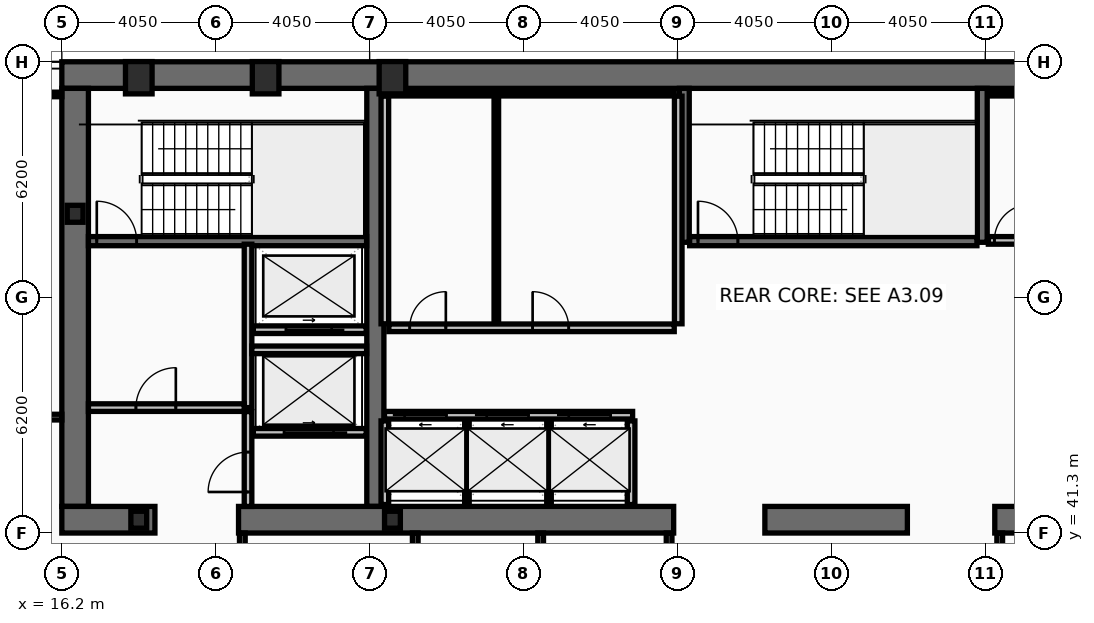
"""IFC4 building model, lengths in metres.
Left out: names, types, materials, properties, quantities, classifications, styles, units other than length and angle.
Written with IfcOpenShell. Run it as: python <this file> out.ifc"""

import sys

from ifc_helpers import new_model, si_unit, direction, frame, frame_2d, origin, origin_2d, place, context, subcontext, project, spatial, rectangle, hollow_rectangle, i_section, extrude, element, fill, save


model = new_model("IFC4")
c1 = context("Model", 3, precision=1e-05, world=origin(), true_north=direction((0.0, 1.0)))
c2 = subcontext(c1, "Body", "Model", "MODEL_VIEW")
j1 = project(units=[si_unit("LENGTHUNIT", "METRE"), si_unit("PLANEANGLEUNIT", "RADIAN")], contexts=[c1])
p1 = place(None, origin())
s1 = spatial("IfcSite", under=j1, at=p1, CompositionType="ELEMENT")
p2 = place(p1, origin())
s2 = spatial("IfcBuilding", under=s1, at=p2, CompositionType="ELEMENT")
p3 = place(p2, frame((0.0, 0.0, 147.0)))
s3 = spatial("IfcBuildingStorey", under=s2, at=p3, CompositionType="ELEMENT", Elevation=147.0)
p4 = place(p3, frame((16.2, 53.35, 0.0), z_axis=(0.0, 0.0, 1.0), x_axis=(1.0, 0.0, 0.0)))
e1 = element("IfcWall", 1, at=p4, inside=s3, PredefinedType="SHEAR", context=c2, shape_type="SweptSolid", body=[
    extrude(rectangle(XDim=40.5, YDim=0.7, at=frame_2d((20.25, 0.0))), origin(), (0.0, 0.0, 1.0), 3.44),
])
p5 = place(p3, frame((16.55, 42.0, 0.0), z_axis=(0.0, 0.0, 1.0), x_axis=(0.0, 1.0, 0.0)))
e2 = element("IfcWall", 2, at=p5, inside=s3, PredefinedType="SHEAR", context=c2, shape_type="SweptSolid", body=[
    extrude(rectangle(XDim=11.0, YDim=0.7, at=frame_2d((5.5, 0.0))), origin(), (0.0, 0.0, 1.0), 3.44),
])
p6 = place(p3, frame((24.45, 42.0, 0.0), z_axis=(0.0, 0.0, 1.0), x_axis=(0.0, 1.0, 0.0)))
e3 = element("IfcWall", 3, at=p6, inside=s3, PredefinedType="SHEAR", context=c2, shape_type="SweptSolid", body=[
    extrude(rectangle(XDim=11.0, YDim=0.45, at=frame_2d((5.5, 0.0))), origin(), (0.0, 0.0, 1.0), 3.44),
])
p7 = place(p3, frame((18.65, 41.65, 0.0), z_axis=(0.0, 0.0, 1.0), x_axis=(-1.0, 0.0, 0.0)))
e4 = element("IfcWall", 4, at=p7, inside=s3, PredefinedType="SHEAR", context=c2, shape_type="SweptSolid", body=[
    extrude(rectangle(XDim=2.45, YDim=0.7, at=frame_2d((1.225, 0.0))), origin(), (0.0, 0.0, 1.0), 3.44),
])
p8 = place(p3, frame((32.3, 41.65, 0.0), z_axis=(0.0, 0.0, 1.0), x_axis=(-1.0, 0.0, 0.0)))
e5 = element("IfcWall", 5, at=p8, inside=s3, PredefinedType="SHEAR", context=c2, shape_type="SweptSolid", body=[
    extrude(rectangle(XDim=11.45, YDim=0.7, at=frame_2d((5.725, 0.0))), origin(), (0.0, 0.0, 1.0), 3.44),
])
p9 = place(p3, frame((38.45, 41.65, 0.0), z_axis=(0.0, 0.0, 1.0), x_axis=(-1.0, 0.0, 0.0)))
e6 = element("IfcWall", 6, at=p9, inside=s3, PredefinedType="SHEAR", context=c2, shape_type="SweptSolid", body=[
    extrude(rectangle(XDim=3.75, YDim=0.7, at=frame_2d((1.875, 0.0))), origin(), (0.0, 0.0, 1.0), 3.44),
])
p10 = place(p3, frame((52.05, 41.65, 0.0), z_axis=(0.0, 0.0, 1.0), x_axis=(-1.0, 0.0, 0.0)))
e7 = element("IfcWall", 7, at=p10, inside=s3, PredefinedType="SHEAR", context=c2, shape_type="SweptSolid", body=[
    extrude(rectangle(XDim=11.3, YDim=0.7, at=frame_2d((5.65, 0.0))), origin(), (0.0, 0.0, 1.0), 3.44),
])
for number, where, z_axis, x_axis in (
    (8, (32.58, 48.95, 0.0), (0.0, 0.0, 1.0), (0.0, 1.0, 0.0)),
    (9, (40.42, 48.95, 0.0), (0.0, 0.0, 1.0), (0.0, 1.0, 0.0)),
):
    element("IfcWall", number, at=place(p3, frame(where, z_axis=z_axis, x_axis=x_axis)), inside=s3, PredefinedType="SHEAR", context=c2, shape_type="SweptSolid", body=[
        extrude(rectangle(XDim=4.05, YDim=0.26, at=frame_2d((2.025, 0.0))), origin(), (0.0, 0.0, 1.0), 3.44),
    ])
p11 = place(p3, frame((16.9, 48.98, 0.0), z_axis=(0.0, 0.0, 1.0), x_axis=(1.0, 0.0, 0.0)))
e10 = element("IfcWall", 10, at=p11, inside=s3, PredefinedType="SHEAR", context=c2, shape_type="SweptSolid", body=[
    extrude(rectangle(XDim=7.32, YDim=0.24, at=frame_2d((3.66, 0.0))), origin(), (0.0, 0.0, 1.0), 3.44),
])
p12 = place(p11, frame((0.22, 0.0, 0.0)))
e11 = element("IfcOpeningElement", 11, at=p12, cuts=e10, PredefinedType="OPENING", context=c2, shape_type="SweptSolid", body=[
    extrude(rectangle(XDim=1.05, YDim=2.15, at=frame_2d((0.525, 1.075))), frame((0.0, 0.13, 0.0), z_axis=(0.0, -1.0, 0.0), x_axis=(1.0, 0.0, 0.0)), (0.0, 0.0, 1.0), 0.26),
])
p13 = place(p3, frame((32.72, 48.98, 0.0), z_axis=(0.0, 0.0, 1.0), x_axis=(1.0, 0.0, 0.0)))
e12 = element("IfcWall", 12, at=p13, inside=s3, PredefinedType="SHEAR", context=c2, shape_type="SweptSolid", body=[
    extrude(rectangle(XDim=7.56, YDim=0.24, at=frame_2d((3.78, 0.0))), origin(), (0.0, 0.0, 1.0), 3.44),
])
p14 = place(p13, frame((0.22, 0.0, 0.0)))
e13 = element("IfcOpeningElement", 13, at=p14, cuts=e12, PredefinedType="OPENING", context=c2, shape_type="SweptSolid", body=[
    extrude(rectangle(XDim=1.05, YDim=2.15, at=frame_2d((0.525, 1.075))), frame((0.0, 0.13, 0.0), z_axis=(0.0, -1.0, 0.0), x_axis=(1.0, 0.0, 0.0)), (0.0, 0.0, 1.0), 0.26),
])
for number, where, z_axis, x_axis in (
    (14, (18.225, 53.28, 0.0), (0.0, 0.0, 1.0), (1.0, 0.0, 0.0)),
    (15, (21.562, 53.28, 0.0), (0.0, 0.0, 1.0), (1.0, 0.0, 0.0)),
    (16, (24.9, 53.28, 0.0), (0.0, 0.0, 1.0), (1.0, 0.0, 0.0)),
):
    element("IfcColumn", number, at=place(p3, frame(where, z_axis=z_axis, x_axis=x_axis)), inside=s3, PredefinedType="COLUMN", context=c2, shape_type="SweptSolid", body=[
        extrude(hollow_rectangle(XDim=0.7, YDim=0.85, WallThickness=0.05, at=origin_2d()), origin(), (0.0, 0.0, 1.0), 3.6),
    ])
for number, where, z_axis, x_axis in (
    (17, (16.55, 49.7, 0.0), (0.0, 0.0, 1.0), (1.0, 0.0, 0.0)),
    (18, (18.225, 41.65, 0.0), (0.0, 0.0, 1.0), (1.0, 0.0, 0.0)),
    (19, (24.9, 41.65, 0.0), (0.0, 0.0, 1.0), (1.0, 0.0, 0.0)),
):
    element("IfcColumn", number, at=place(p3, frame(where, z_axis=z_axis, x_axis=x_axis)), inside=s3, PredefinedType="COLUMN", context=c2, shape_type="SweptSolid", body=[
        extrude(i_section(OverallWidth=0.416, OverallDepth=0.446, WebThickness=0.039, FlangeThickness=0.063, at=origin_2d()), origin(), (0.0, 0.0, 1.0), 3.6),
    ])
p15 = place(p3, frame((24.69, 44.4, 0.0), z_axis=(0.0, 0.0, 1.0), x_axis=(1.0, 0.0, 0.0)))
e20 = element("IfcWall", 20, at=p15, inside=s3, PredefinedType="PARTITIONING", context=c2, shape_type="SweptSolid", body=[
    extrude(rectangle(XDim=6.53, YDim=0.2, at=frame_2d((3.265, 0.0))), origin(), (0.0, 0.0, 1.0), 3.44),
])
p16 = place(p15, frame((0.53, 0.0, 0.0)))
e21 = element("IfcOpeningElement", 21, at=p16, cuts=e20, PredefinedType="OPENING", context=c2, shape_type="SweptSolid", body=[
    extrude(rectangle(XDim=1.1, YDim=2.18, at=frame_2d((0.55, 1.09))), frame((0.0, 0.11, 0.0), z_axis=(0.0, -1.0, 0.0), x_axis=(1.0, 0.0, 0.0)), (0.0, 0.0, 1.0), 0.22),
])
p17 = place(p15, frame((2.69, 0.0, 0.0)))
e22 = element("IfcOpeningElement", 22, at=p17, cuts=e20, PredefinedType="OPENING", context=c2, shape_type="SweptSolid", body=[
    extrude(rectangle(XDim=1.1, YDim=2.18, at=frame_2d((0.55, 1.09))), frame((0.0, 0.11, 0.0), z_axis=(0.0, -1.0, 0.0), x_axis=(1.0, 0.0, 0.0)), (0.0, 0.0, 1.0), 0.22),
])
p18 = place(p15, frame((4.85, 0.0, 0.0)))
e23 = element("IfcOpeningElement", 23, at=p18, cuts=e20, PredefinedType="OPENING", context=c2, shape_type="SweptSolid", body=[
    extrude(rectangle(XDim=1.1, YDim=2.18, at=frame_2d((0.55, 1.09))), frame((0.0, 0.11, 0.0), z_axis=(0.0, -1.0, 0.0), x_axis=(1.0, 0.0, 0.0)), (0.0, 0.0, 1.0), 0.22),
])
p19 = place(p3, frame((24.21, 43.95, 0.0), z_axis=(0.0, 0.0, 1.0), x_axis=(-1.0, 0.0, 0.0)))
e24 = element("IfcWall", 24, at=p19, inside=s3, PredefinedType="PARTITIONING", context=c2, shape_type="SweptSolid", body=[
    extrude(rectangle(XDim=2.97, YDim=0.2, at=frame_2d((1.485, 0.0))), origin(), (0.0, 0.0, 1.0), 3.44),
])
p20 = place(p19, frame((0.86, 0.0, 0.0)))
e25 = element("IfcOpeningElement", 25, at=p20, cuts=e24, PredefinedType="OPENING", context=c2, shape_type="SweptSolid", body=[
    extrude(rectangle(XDim=1.3, YDim=2.18, at=frame_2d((0.65, 1.09))), frame((0.0, 0.11, 0.0), z_axis=(0.0, -1.0, 0.0), x_axis=(1.0, 0.0, 0.0)), (0.0, 0.0, 1.0), 0.22),
])
p21 = place(p3, frame((24.21, 46.65, 0.0), z_axis=(0.0, 0.0, 1.0), x_axis=(-1.0, 0.0, 0.0)))
e26 = element("IfcWall", 26, at=p21, inside=s3, PredefinedType="PARTITIONING", context=c2, shape_type="SweptSolid", body=[
    extrude(rectangle(XDim=2.97, YDim=0.2, at=frame_2d((1.485, 0.0))), origin(), (0.0, 0.0, 1.0), 3.44),
])
p22 = place(p21, frame((0.91, 0.0, 0.0)))
e27 = element("IfcOpeningElement", 27, at=p22, cuts=e26, PredefinedType="OPENING", context=c2, shape_type="SweptSolid", body=[
    extrude(rectangle(XDim=1.2, YDim=2.18, at=frame_2d((0.6, 1.09))), frame((0.0, 0.11, 0.0), z_axis=(0.0, -1.0, 0.0), x_axis=(1.0, 0.0, 0.0)), (0.0, 0.0, 1.0), 0.22),
])
p23 = place(p3, frame((21.1, 44.6, 0.0), z_axis=(0.0, 0.0, 1.0), x_axis=(0.0, 1.0, 0.0)))
e28 = element("IfcWall", 28, at=p23, inside=s3, PredefinedType="PARTITIONING", context=c2, shape_type="SweptSolid", body=[
    extrude(rectangle(XDim=4.3, YDim=0.2, at=frame_2d((2.15, 0.0))), origin(), (0.0, 0.0, 1.0), 3.44),
])
p24 = place(p3, frame((16.9, 44.6, 0.0), z_axis=(0.0, 0.0, 1.0), x_axis=(1.0, 0.0, 0.0)))
e29 = element("IfcWall", 29, at=p24, inside=s3, PredefinedType="PARTITIONING", context=c2, shape_type="SweptSolid", body=[
    extrude(rectangle(XDim=4.1, YDim=0.2, at=frame_2d((2.05, 0.0))), origin(), (0.0, 0.0, 1.0), 3.44),
])
p25 = place(p24, frame((1.25, 0.0, 0.0)))
e30 = element("IfcOpeningElement", 30, at=p25, cuts=e29, PredefinedType="OPENING", context=c2, shape_type="SweptSolid", body=[
    extrude(rectangle(XDim=1.05, YDim=2.15, at=frame_2d((0.525, 1.075))), frame((0.0, 0.11, 0.0), z_axis=(0.0, -1.0, 0.0), x_axis=(1.0, 0.0, 0.0)), (0.0, 0.0, 1.0), 0.22),
])
p26 = place(p3, frame((21.2, 46.12, 0.0), z_axis=(0.0, 0.0, 1.0), x_axis=(1.0, 0.0, 0.0)))
e31 = element("IfcWall", 31, at=p26, inside=s3, PredefinedType="PARTITIONING", context=c2, shape_type="SweptSolid", body=[
    extrude(rectangle(XDim=3.02, YDim=0.2, at=frame_2d((1.51, 0.0))), origin(), (0.0, 0.0, 1.0), 3.44),
])
p27 = place(p3, frame((21.1, 42.0, 0.0), z_axis=(0.0, 0.0, 1.0), x_axis=(0.0, 1.0, 0.0)))
e32 = element("IfcWall", 32, at=p27, inside=s3, PredefinedType="PARTITIONING", context=c2, shape_type="SweptSolid", body=[
    extrude(rectangle(XDim=2.495, YDim=0.2, at=frame_2d((1.248, 0.0))), origin(), (0.0, 0.0, 1.0), 3.44),
])
p28 = place(p27, frame((0.38, 0.0, 0.0)))
e33 = element("IfcOpeningElement", 33, at=p28, cuts=e32, PredefinedType="OPENING", context=c2, shape_type="SweptSolid", body=[
    extrude(rectangle(XDim=1.05, YDim=2.15, at=frame_2d((0.525, 1.075))), frame((0.0, 0.11, 0.0), z_axis=(0.0, -1.0, 0.0), x_axis=(1.0, 0.0, 0.0)), (0.0, 0.0, 1.0), 0.22),
])
for number, where, z_axis, x_axis in (
    (34, (24.7, 46.805, 0.0), (0.0, 0.0, 1.0), (0.0, 1.0, 0.0)),
    (35, (32.42, 46.805, 0.0), (0.0, 0.0, 1.0), (0.0, 1.0, 0.0)),
):
    element("IfcWall", number, at=place(p3, frame(where, z_axis=z_axis, x_axis=x_axis)), inside=s3, PredefinedType="PARTITIONING", context=c2, shape_type="SweptSolid", body=[
        extrude(rectangle(XDim=5.99, YDim=0.2, at=frame_2d((2.995, 0.0))), origin(), (0.0, 0.0, 1.0), 3.44),
    ])
p29 = place(p3, frame((24.805, 52.86, 0.0), z_axis=(0.0, 0.0, 1.0), x_axis=(1.0, 0.0, 0.0)))
e36 = element("IfcWall", 36, at=p29, inside=s3, PredefinedType="PARTITIONING", context=c2, shape_type="SweptSolid", body=[
    extrude(rectangle(XDim=7.51, YDim=0.12, at=frame_2d((3.755, 0.0))), origin(), (0.0, 0.0, 1.0), 3.44),
])
p30 = place(p3, frame((27.634, 46.805, 0.0), z_axis=(0.0, 0.0, 1.0), x_axis=(0.0, 1.0, 0.0)))
e37 = element("IfcWall", 37, at=p30, inside=s3, PredefinedType="PARTITIONING", context=c2, shape_type="SweptSolid", body=[
    extrude(rectangle(XDim=5.99, YDim=0.12, at=frame_2d((2.995, 0.0))), origin(), (0.0, 0.0, 1.0), 3.44),
])
p31 = place(p3, frame((24.805, 46.7, 0.0), z_axis=(0.0, 0.0, 1.0), x_axis=(1.0, 0.0, 0.0)))
e38 = element("IfcWall", 38, at=p31, inside=s3, PredefinedType="PARTITIONING", context=c2, shape_type="SweptSolid", body=[
    extrude(rectangle(XDim=7.51, YDim=0.2, at=frame_2d((3.755, 0.0))), origin(), (0.0, 0.0, 1.0), 3.44),
])
p32 = place(p31, frame((0.55, 0.0, 0.0)))
e39 = element("IfcOpeningElement", 39, at=p32, cuts=e38, PredefinedType="OPENING", context=c2, shape_type="SweptSolid", body=[
    extrude(rectangle(XDim=0.95, YDim=2.1, at=frame_2d((0.475, 1.05))), frame((0.0, 0.11, 0.0), z_axis=(0.0, -1.0, 0.0), x_axis=(1.0, 0.0, 0.0)), (0.0, 0.0, 1.0), 0.22),
])
p33 = place(p31, frame((3.784, 0.0, 0.0)))
e40 = element("IfcOpeningElement", 40, at=p33, cuts=e38, PredefinedType="OPENING", context=c2, shape_type="SweptSolid", body=[
    extrude(rectangle(XDim=0.95, YDim=2.1, at=frame_2d((0.475, 1.05))), frame((0.0, 0.11, 0.0), z_axis=(0.0, -1.0, 0.0), x_axis=(1.0, 0.0, 0.0)), (0.0, 0.0, 1.0), 0.22),
])
for number, where, z_axis, x_axis in (
    (41, (24.7, 42.05, 0.0), (0.0, 0.0, 1.0), (0.0, 1.0, 0.0)),
    (42, (31.18, 42.05, 0.0), (0.0, 0.0, 1.0), (0.0, 1.0, 0.0)),
):
    element("IfcWall", number, at=place(p3, frame(where, z_axis=z_axis, x_axis=x_axis)), inside=s3, PredefinedType="PARTITIONING", context=c2, shape_type="SweptSolid", body=[
        extrude(rectangle(XDim=2.2, YDim=0.2, at=frame_2d((1.1, 0.0))), origin(), (0.0, 0.0, 1.0), 3.44),
    ])
for number, where, z_axis, x_axis in (
    (43, (26.86, 42.05, 0.0), (0.0, 0.0, 1.0), (0.0, 1.0, 0.0)),
    (44, (29.02, 42.05, 0.0), (0.0, 0.0, 1.0), (0.0, 1.0, 0.0)),
):
    element("IfcWall", number, at=place(p3, frame(where, z_axis=z_axis, x_axis=x_axis)), inside=s3, PredefinedType="PARTITIONING", context=c2, shape_type="SweptSolid", body=[
        extrude(rectangle(XDim=2.2, YDim=0.12, at=frame_2d((1.1, 0.0))), origin(), (0.0, 0.0, 1.0), 3.44),
    ])
p34 = place(p3, frame((40.58, 52.86, 0.0), z_axis=(0.0, 0.0, 1.0), x_axis=(1.0, 0.0, 0.0)))
e45 = element("IfcWall", 45, at=p34, inside=s3, PredefinedType="PARTITIONING", context=c2, shape_type="SweptSolid", body=[
    extrude(rectangle(XDim=7.56, YDim=0.12, at=frame_2d((3.78, 0.0))), origin(), (0.0, 0.0, 1.0), 3.44),
])
p35 = place(p3, frame((40.58, 49.0, 0.0), z_axis=(0.0, 0.0, 1.0), x_axis=(1.0, 0.0, 0.0)))
e46 = element("IfcWall", 46, at=p35, inside=s3, PredefinedType="PARTITIONING", context=c2, shape_type="SweptSolid", body=[
    extrude(rectangle(XDim=7.56, YDim=0.2, at=frame_2d((3.78, 0.0))), origin(), (0.0, 0.0, 1.0), 3.44),
])
p36 = place(p35, frame((0.16, 0.0, 0.0)))
e47 = element("IfcOpeningElement", 47, at=p36, cuts=e46, PredefinedType="OPENING", context=c2, shape_type="SweptSolid", body=[
    extrude(rectangle(XDim=0.95, YDim=2.1, at=frame_2d((0.475, 1.05))), frame((0.0, 0.11, 0.0), z_axis=(0.0, -1.0, 0.0), x_axis=(1.0, 0.0, 0.0)), (0.0, 0.0, 1.0), 0.22),
])
for number, where, z_axis, x_axis in (
    (48, (20.95, 38.28, 0.0), (0.0, 0.0, 1.0), (0.0, 1.0, 0.0)),
    (49, (25.5, 38.28, 0.0), (0.0, 0.0, 1.0), (0.0, 1.0, 0.0)),
    (50, (28.8, 38.28, 0.0), (0.0, 0.0, 1.0), (0.0, 1.0, 0.0)),
    (51, (32.18, 38.28, 0.0), (0.0, 0.0, 1.0), (0.0, 1.0, 0.0)),
    (52, (40.88, 38.28, 0.0), (0.0, 0.0, 1.0), (0.0, 1.0, 0.0)),
):
    element("IfcWall", number, at=place(p3, frame(where, z_axis=z_axis, x_axis=x_axis)), inside=s3, PredefinedType="PARTITIONING", context=c2, shape_type="SweptSolid", body=[
        extrude(rectangle(XDim=3.02, YDim=0.15, at=frame_2d((1.51, 0.0))), origin(), (0.0, 0.0, 1.0), 3.44),
    ])
p37 = place(p3, frame((6.095, 44.35, 0.0), z_axis=(0.0, 0.0, 1.0), x_axis=(1.0, 0.0, 0.0)))
e53 = element("IfcWall", 53, at=p37, inside=s3, PredefinedType="PARTITIONING", context=c2, shape_type="SweptSolid", body=[
    extrude(rectangle(XDim=10.105, YDim=0.15, at=frame_2d((5.052, 0.0))), origin(), (0.0, 0.0, 1.0), 2.83),
])
p38 = place(p37, frame((8.32, 0.0, 0.0)))
e54 = element("IfcOpeningElement", 54, at=p38, cuts=e53, PredefinedType="OPENING", context=c2, shape_type="SweptSolid", body=[
    extrude(rectangle(XDim=0.9, YDim=2.05, at=frame_2d((0.45, 1.025))), frame((0.0, 0.085, 0.0), z_axis=(0.0, -1.0, 0.0), x_axis=(1.0, 0.0, 0.0)), (0.0, 0.0, 1.0), 0.17),
])
p39 = place(p3, frame((6.095, 52.84, 0.0), z_axis=(0.0, 0.0, 1.0), x_axis=(1.0, 0.0, 0.0)))
e55 = element("IfcWall", 55, at=p39, inside=s3, PredefinedType="PARTITIONING", context=c2, shape_type="SweptSolid", body=[
    extrude(rectangle(XDim=10.105, YDim=0.12, at=frame_2d((5.052, 0.0))), origin(), (0.0, 0.0, 1.0), 3.44),
])
p40 = place(p12, origin())
e56 = element("IfcDoor", 56, at=p40, inside=s3, OperationType="SINGLE_SWING_LEFT", PredefinedType="DOOR", context=c2, shape_type="SweptSolid", body=[
    extrude(rectangle(XDim=1.05, YDim=2.15, at=frame_2d((0.525, 1.075))), frame((0.0, 0.025, 0.0), z_axis=(0.0, -1.0, 0.0), x_axis=(1.0, 0.0, 0.0)), (0.0, 0.0, 1.0), 0.05),
])
fill(e11, e56)
p41 = place(p14, origin())
e57 = element("IfcDoor", 57, at=p41, inside=s3, OperationType="SINGLE_SWING_LEFT", PredefinedType="DOOR", context=c2, shape_type="SweptSolid", body=[
    extrude(rectangle(XDim=1.05, YDim=2.15, at=frame_2d((0.525, 1.075))), frame((0.0, 0.025, 0.0), z_axis=(0.0, -1.0, 0.0), x_axis=(1.0, 0.0, 0.0)), (0.0, 0.0, 1.0), 0.05),
])
fill(e13, e57)
p42 = place(p16, origin())
e58 = element("IfcDoor", 58, at=p42, inside=s3, OperationType="SLIDING_TO_LEFT", PredefinedType="DOOR", context=c2, shape_type="SweptSolid", body=[
    extrude(rectangle(XDim=1.1, YDim=2.18, at=frame_2d((0.55, 1.09))), frame((0.0, 0.025, 0.0), z_axis=(0.0, -1.0, 0.0), x_axis=(1.0, 0.0, 0.0)), (0.0, 0.0, 1.0), 0.05),
])
fill(e21, e58)
p43 = place(p17, origin())
e59 = element("IfcDoor", 59, at=p43, inside=s3, OperationType="SLIDING_TO_LEFT", PredefinedType="DOOR", context=c2, shape_type="SweptSolid", body=[
    extrude(rectangle(XDim=1.1, YDim=2.18, at=frame_2d((0.55, 1.09))), frame((0.0, 0.025, 0.0), z_axis=(0.0, -1.0, 0.0), x_axis=(1.0, 0.0, 0.0)), (0.0, 0.0, 1.0), 0.05),
])
fill(e22, e59)
p44 = place(p18, origin())
e60 = element("IfcDoor", 60, at=p44, inside=s3, OperationType="SLIDING_TO_LEFT", PredefinedType="DOOR", context=c2, shape_type="SweptSolid", body=[
    extrude(rectangle(XDim=1.1, YDim=2.18, at=frame_2d((0.55, 1.09))), frame((0.0, 0.025, 0.0), z_axis=(0.0, -1.0, 0.0), x_axis=(1.0, 0.0, 0.0)), (0.0, 0.0, 1.0), 0.05),
])
fill(e23, e60)
p45 = place(p20, origin())
e61 = element("IfcDoor", 61, at=p45, inside=s3, OperationType="SLIDING_TO_LEFT", PredefinedType="DOOR", context=c2, shape_type="SweptSolid", body=[
    extrude(rectangle(XDim=1.3, YDim=2.18, at=frame_2d((0.65, 1.09))), frame((0.0, 0.025, 0.0), z_axis=(0.0, -1.0, 0.0), x_axis=(1.0, 0.0, 0.0)), (0.0, 0.0, 1.0), 0.05),
])
fill(e25, e61)
p46 = place(p22, origin())
e62 = element("IfcDoor", 62, at=p46, inside=s3, OperationType="SLIDING_TO_LEFT", PredefinedType="DOOR", context=c2, shape_type="SweptSolid", body=[
    extrude(rectangle(XDim=1.2, YDim=2.18, at=frame_2d((0.6, 1.09))), frame((0.0, 0.025, 0.0), z_axis=(0.0, -1.0, 0.0), x_axis=(1.0, 0.0, 0.0)), (0.0, 0.0, 1.0), 0.05),
])
fill(e27, e62)
p47 = place(p25, origin())
e63 = element("IfcDoor", 63, at=p47, inside=s3, OperationType="SINGLE_SWING_RIGHT", PredefinedType="DOOR", context=c2, shape_type="SweptSolid", body=[
    extrude(rectangle(XDim=1.05, YDim=2.15, at=frame_2d((0.525, 1.075))), frame((0.0, 0.025, 0.0), z_axis=(0.0, -1.0, 0.0), x_axis=(1.0, 0.0, 0.0)), (0.0, 0.0, 1.0), 0.05),
])
fill(e30, e63)
p48 = place(p28, origin())
e64 = element("IfcDoor", 64, at=p48, inside=s3, OperationType="SINGLE_SWING_LEFT", PredefinedType="DOOR", context=c2, shape_type="SweptSolid", body=[
    extrude(rectangle(XDim=1.05, YDim=2.15, at=frame_2d((0.525, 1.075))), frame((0.0, 0.025, 0.0), z_axis=(0.0, -1.0, 0.0), x_axis=(1.0, 0.0, 0.0)), (0.0, 0.0, 1.0), 0.05),
])
fill(e33, e64)
p49 = place(p32, origin())
e65 = element("IfcDoor", 65, at=p49, inside=s3, OperationType="SINGLE_SWING_RIGHT", PredefinedType="DOOR", context=c2, shape_type="SweptSolid", body=[
    extrude(rectangle(XDim=0.95, YDim=2.1, at=frame_2d((0.475, 1.05))), frame((0.0, 0.025, 0.0), z_axis=(0.0, -1.0, 0.0), x_axis=(1.0, 0.0, 0.0)), (0.0, 0.0, 1.0), 0.05),
])
fill(e39, e65)
p50 = place(p33, origin())
e66 = element("IfcDoor", 66, at=p50, inside=s3, OperationType="SINGLE_SWING_LEFT", PredefinedType="DOOR", context=c2, shape_type="SweptSolid", body=[
    extrude(rectangle(XDim=0.95, YDim=2.1, at=frame_2d((0.475, 1.05))), frame((0.0, 0.025, 0.0), z_axis=(0.0, -1.0, 0.0), x_axis=(1.0, 0.0, 0.0)), (0.0, 0.0, 1.0), 0.05),
])
fill(e40, e66)
p51 = place(p36, origin())
e67 = element("IfcDoor", 67, at=p51, inside=s3, OperationType="SINGLE_SWING_RIGHT", PredefinedType="DOOR", context=c2, shape_type="SweptSolid", body=[
    extrude(rectangle(XDim=0.95, YDim=2.1, at=frame_2d((0.475, 1.05))), frame((0.0, 0.025, 0.0), z_axis=(0.0, -1.0, 0.0), x_axis=(1.0, 0.0, 0.0)), (0.0, 0.0, 1.0), 0.05),
])
fill(e47, e67)
save(model, sys.argv[1])
